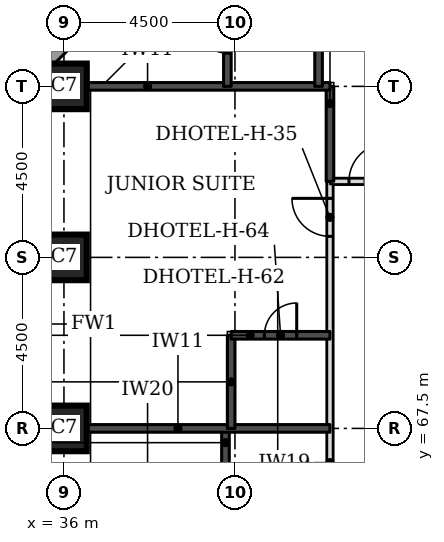
"""IFC4 building model, lengths in metres.
Left out: names, types, materials, properties, quantities, classifications, styles, units other than length and angle.
Written with IfcOpenShell. Run it as: python <this file> out.ifc"""

import sys

from ifc_helpers import new_model, si_unit, direction, frame, frame_2d, origin, origin_2d, place, context, subcontext, project, spatial, rectangle, extrude, element, fill, save


model = new_model("IFC4")
c1 = context("Model", 3, precision=1e-05, world=origin(), true_north=direction((0.0, 1.0)))
c2 = subcontext(c1, "Body", "Model", "MODEL_VIEW")
j1 = project(units=[si_unit("LENGTHUNIT", "METRE"), si_unit("PLANEANGLEUNIT", "RADIAN")], contexts=[c1])
p1 = place(None, origin())
s1 = spatial("IfcSite", under=j1, at=p1, CompositionType="ELEMENT")
p2 = place(p1, origin())
s2 = spatial("IfcBuilding", under=s1, at=p2, CompositionType="ELEMENT")
p3 = place(p2, frame((0.0, 0.0, 46.2)))
s3 = spatial("IfcBuildingStorey", under=s2, at=p3, CompositionType="ELEMENT", Elevation=46.2)
for number, where, z_axis, x_axis in (
    (1, (36.0, 67.5, 0.0), (0.0, 0.0, 1.0), (1.0, 0.0, 0.0)),
    (2, (36.0, 72.0, 0.0), (0.0, 0.0, 1.0), (1.0, 0.0, 0.0)),
    (3, (36.0, 76.5, 0.0), (0.0, 0.0, 1.0), (1.0, 0.0, 0.0)),
):
    element("IfcColumn", number, at=place(p3, frame(where, z_axis=z_axis, x_axis=x_axis)), inside=s3, PredefinedType="COLUMN", context=c2, shape_type="SweptSolid", body=[
        extrude(rectangle(XDim=1.2, YDim=1.2, at=origin_2d()), origin(), (0.0, 0.0, 1.0), 3.3),
    ])
p4 = place(p3, frame((40.23, 81.826, 0.0), z_axis=(0.0, 0.0, 1.0), x_axis=(-0.707106781187, -0.707106781187, 0.0)))
e4 = element("IfcWall", 4, at=p4, inside=s3, PredefinedType="STANDARD", context=c2, shape_type="SweptSolid", body=[
    extrude(rectangle(XDim=7.151, YDim=0.35, at=frame_2d((3.576, 0.0))), origin(), (0.0, 0.0, 1.0), 3.055),
])
p5 = place(p4, frame((1.926, 0.0, 0.8)))
e5 = element("IfcOpeningElement", 5, at=p5, cuts=e4, PredefinedType="OPENING", context=c2, shape_type="SweptSolid", body=[
    extrude(rectangle(XDim=3.3, YDim=1.5, at=frame_2d((1.65, 0.75))), frame((0.0, 0.185, 0.0), z_axis=(0.0, -1.0, 0.0), x_axis=(1.0, 0.0, 0.0)), (0.0, 0.0, 1.0), 0.37),
])
p6 = place(p3, frame((43.0, 56.0, 0.0), z_axis=(0.0, 0.0, 1.0), x_axis=(0.0, 1.0, 0.0)))
e6 = element("IfcWall", 6, at=p6, inside=s3, PredefinedType="PARTITIONING", context=c2, shape_type="SweptSolid", body=[
    extrude(rectangle(XDim=18.0, YDim=0.15, at=frame_2d((9.0, 0.0))), origin(), (0.0, 0.0, 1.0), 3.08),
])
p7 = place(p6, frame((7.575, 0.0, 0.0)))
e7 = element("IfcOpeningElement", 7, at=p7, cuts=e6, PredefinedType="OPENING", context=c2, shape_type="SweptSolid", body=[
    extrude(rectangle(XDim=1.0, YDim=2.1, at=frame_2d((0.5, 1.05))), frame((0.0, 0.085, 0.0), z_axis=(0.0, -1.0, 0.0), x_axis=(1.0, 0.0, 0.0)), (0.0, 0.0, 1.0), 0.17),
])
p8 = place(p6, frame((16.553, 0.0, 0.0)))
e8 = element("IfcOpeningElement", 8, at=p8, cuts=e6, PredefinedType="OPENING", context=c2, shape_type="SweptSolid", body=[
    extrude(rectangle(XDim=1.0, YDim=2.1, at=frame_2d((0.5, 1.05))), frame((0.0, 0.085, 0.0), z_axis=(0.0, -1.0, 0.0), x_axis=(1.0, 0.0, 0.0)), (0.0, 0.0, 1.0), 0.17),
])
p9 = place(p6, frame((3.05, 0.0, 0.0)))
e9 = element("IfcOpeningElement", 9, at=p9, cuts=e6, PredefinedType="OPENING", context=c2, shape_type="SweptSolid", body=[
    extrude(rectangle(XDim=0.9, YDim=2.1, at=frame_2d((0.45, 1.05))), frame((0.0, 0.085, 0.0), z_axis=(0.0, -1.0, 0.0), x_axis=(1.0, 0.0, 0.0)), (0.0, 0.0, 1.0), 0.17),
])
p10 = place(p3, frame((43.0, 74.0, 0.0), z_axis=(0.0, 0.0, 1.0), x_axis=(1.0, 0.0, 0.0)))
e10 = element("IfcWall", 10, at=p10, inside=s3, PredefinedType="PARTITIONING", context=c2, shape_type="SweptSolid", body=[
    extrude(rectangle(XDim=26.5, YDim=0.15, at=frame_2d((13.25, 0.0))), origin(), (0.0, 0.0, 1.0), 3.08),
])
p11 = place(p10, frame((2.575, 0.0, 0.0)))
e11 = element("IfcOpeningElement", 11, at=p11, cuts=e10, PredefinedType="OPENING", context=c2, shape_type="SweptSolid", body=[
    extrude(rectangle(XDim=1.0, YDim=2.1, at=frame_2d((0.5, 1.05))), frame((0.0, 0.085, 0.0), z_axis=(0.0, -1.0, 0.0), x_axis=(1.0, 0.0, 0.0)), (0.0, 0.0, 1.0), 0.17),
])
p12 = place(p10, frame((9.175, 0.0, 0.0)))
e12 = element("IfcOpeningElement", 12, at=p12, cuts=e10, PredefinedType="OPENING", context=c2, shape_type="SweptSolid", body=[
    extrude(rectangle(XDim=1.0, YDim=2.1, at=frame_2d((0.5, 1.05))), frame((0.0, 0.085, 0.0), z_axis=(0.0, -1.0, 0.0), x_axis=(1.0, 0.0, 0.0)), (0.0, 0.0, 1.0), 0.17),
])
p13 = place(p10, frame((11.575, 0.0, 0.0)))
e13 = element("IfcOpeningElement", 13, at=p13, cuts=e10, PredefinedType="OPENING", context=c2, shape_type="SweptSolid", body=[
    extrude(rectangle(XDim=1.0, YDim=2.1, at=frame_2d((0.5, 1.05))), frame((0.0, 0.085, 0.0), z_axis=(0.0, -1.0, 0.0), x_axis=(1.0, 0.0, 0.0)), (0.0, 0.0, 1.0), 0.17),
])
p14 = place(p10, frame((18.175, 0.0, 0.0)))
e14 = element("IfcOpeningElement", 14, at=p14, cuts=e10, PredefinedType="OPENING", context=c2, shape_type="SweptSolid", body=[
    extrude(rectangle(XDim=1.0, YDim=2.1, at=frame_2d((0.5, 1.05))), frame((0.0, 0.085, 0.0), z_axis=(0.0, -1.0, 0.0), x_axis=(1.0, 0.0, 0.0)), (0.0, 0.0, 1.0), 0.17),
])
p15 = place(p10, frame((20.575, 0.0, 0.0)))
e15 = element("IfcOpeningElement", 15, at=p15, cuts=e10, PredefinedType="OPENING", context=c2, shape_type="SweptSolid", body=[
    extrude(rectangle(XDim=1.0, YDim=2.1, at=frame_2d((0.5, 1.05))), frame((0.0, 0.085, 0.0), z_axis=(0.0, -1.0, 0.0), x_axis=(1.0, 0.0, 0.0)), (0.0, 0.0, 1.0), 0.17),
])
p16 = place(p10, frame((0.5, 0.0, 0.0)))
e16 = element("IfcOpeningElement", 16, at=p16, cuts=e10, PredefinedType="OPENING", context=c2, shape_type="SweptSolid", body=[
    extrude(rectangle(XDim=1.0, YDim=2.1, at=frame_2d((0.5, 1.05))), frame((0.0, 0.085, 0.0), z_axis=(0.0, -1.0, 0.0), x_axis=(1.0, 0.0, 0.0)), (0.0, 0.0, 1.0), 0.17),
])
p17 = place(p10, frame((25.0, 0.0, 0.0)))
e17 = element("IfcOpeningElement", 17, at=p17, cuts=e10, PredefinedType="OPENING", context=c2, shape_type="SweptSolid", body=[
    extrude(rectangle(XDim=1.0, YDim=2.1, at=frame_2d((0.5, 1.05))), frame((0.0, 0.085, 0.0), z_axis=(0.0, -1.0, 0.0), x_axis=(1.0, 0.0, 0.0)), (0.0, 0.0, 1.0), 0.17),
])
p18 = place(p3, frame((40.25, 65.15, 0.0), z_axis=(0.0, 0.0, 1.0), x_axis=(0.0, 1.0, 0.0)))
e18 = element("IfcWall", 18, at=p18, inside=s3, PredefinedType="SOLIDWALL", context=c2, shape_type="SweptSolid", body=[
    extrude(rectangle(XDim=2.35, YDim=0.2, at=frame_2d((1.175, 0.0))), origin(), (0.0, 0.0, 1.0), 3.08),
])
p19 = place(p3, frame((36.6, 67.5, 0.0), z_axis=(0.0, 0.0, 1.0), x_axis=(1.0, 0.0, 0.0)))
e19 = element("IfcWall", 19, at=p19, inside=s3, PredefinedType="SOLIDWALL", context=c2, shape_type="SweptSolid", body=[
    extrude(rectangle(XDim=6.4, YDim=0.2, at=frame_2d((3.2, 0.0))), origin(), (0.0, 0.0, 1.0), 3.08),
])
p20 = place(p3, frame((40.4, 67.5, 0.0), z_axis=(0.0, 0.0, 1.0), x_axis=(0.0, 1.0, 0.0)))
e20 = element("IfcWall", 20, at=p20, inside=s3, PredefinedType="SOLIDWALL", context=c2, shape_type="SweptSolid", body=[
    extrude(rectangle(XDim=2.45, YDim=0.2, at=frame_2d((1.225, 0.0))), origin(), (0.0, 0.0, 1.0), 3.08),
])
p21 = place(p3, frame((40.4, 69.95, 0.0), z_axis=(0.0, 0.0, 1.0), x_axis=(1.0, 0.0, 0.0)))
e21 = element("IfcWall", 21, at=p21, inside=s3, PredefinedType="SOLIDWALL", context=c2, shape_type="SweptSolid", body=[
    extrude(rectangle(XDim=2.6, YDim=0.2, at=frame_2d((1.3, 0.0))), origin(), (0.0, 0.0, 1.0), 3.08),
])
p22 = place(p21, frame((0.875, 0.0, 0.0)))
e22 = element("IfcOpeningElement", 22, at=p22, cuts=e21, PredefinedType="OPENING", context=c2, shape_type="SweptSolid", body=[
    extrude(rectangle(XDim=0.85, YDim=2.1, at=frame_2d((0.425, 1.05))), frame((0.0, 0.11, 0.0), z_axis=(0.0, -1.0, 0.0), x_axis=(1.0, 0.0, 0.0)), (0.0, 0.0, 1.0), 0.22),
])
p23 = place(p3, frame((43.0, 74.0, 0.0), z_axis=(0.0, 0.0, 1.0), x_axis=(0.0, 1.0, 0.0)))
e23 = element("IfcWall", 23, at=p23, inside=s3, PredefinedType="SOLIDWALL", context=c2, shape_type="SweptSolid", body=[
    extrude(rectangle(XDim=2.5, YDim=0.2, at=frame_2d((1.25, 0.0))), origin(), (0.0, 0.0, 1.0), 3.08),
])
p24 = place(p3, frame((36.6, 76.5, 0.0), z_axis=(0.0, 0.0, 1.0), x_axis=(1.0, 0.0, 0.0)))
e24 = element("IfcWall", 24, at=p24, inside=s3, PredefinedType="SOLIDWALL", context=c2, shape_type="SweptSolid", body=[
    extrude(rectangle(XDim=6.4, YDim=0.2, at=frame_2d((3.2, 0.0))), origin(), (0.0, 0.0, 1.0), 3.08),
])
p25 = place(p3, frame((40.3, 76.5, 0.0), z_axis=(0.0, 0.0, 1.0), x_axis=(0.0, 1.0, 0.0)))
e25 = element("IfcWall", 25, at=p25, inside=s3, PredefinedType="SOLIDWALL", context=c2, shape_type="SweptSolid", body=[
    extrude(rectangle(XDim=2.5, YDim=0.2, at=frame_2d((1.25, 0.0))), origin(), (0.0, 0.0, 1.0), 3.08),
])
p26 = place(p25, frame((0.875, 0.0, 0.0)))
e26 = element("IfcOpeningElement", 26, at=p26, cuts=e25, PredefinedType="OPENING", context=c2, shape_type="SweptSolid", body=[
    extrude(rectangle(XDim=0.85, YDim=2.1, at=frame_2d((0.425, 1.05))), frame((0.0, 0.11, 0.0), z_axis=(0.0, -1.0, 0.0), x_axis=(1.0, 0.0, 0.0)), (0.0, 0.0, 1.0), 0.22),
])
p27 = place(p3, frame((42.7, 76.5, 0.0), z_axis=(0.0, 0.0, 1.0), x_axis=(0.0, 1.0, 0.0)))
e27 = element("IfcWall", 27, at=p27, inside=s3, PredefinedType="SOLIDWALL", context=c2, shape_type="SweptSolid", body=[
    extrude(rectangle(XDim=2.5, YDim=0.2, at=frame_2d((1.25, 0.0))), origin(), (0.0, 0.0, 1.0), 3.08),
])
p28 = place(p8, origin())
e28 = element("IfcDoor", 28, at=p28, inside=s3, OperationType="SINGLE_SWING_RIGHT", PredefinedType="DOOR", context=c2, shape_type="SweptSolid", body=[
    extrude(rectangle(XDim=1.0, YDim=2.1, at=frame_2d((0.5, 1.05))), frame((0.0, 0.025, 0.0), z_axis=(0.0, -1.0, 0.0), x_axis=(1.0, 0.0, 0.0)), (0.0, 0.0, 1.0), 0.05),
])
fill(e8, e28)
p29 = place(p22, origin())
e29 = element("IfcDoor", 29, at=p29, inside=s3, OperationType="SINGLE_SWING_RIGHT", PredefinedType="DOOR", context=c2, shape_type="SweptSolid", body=[
    extrude(rectangle(XDim=0.85, YDim=2.1, at=frame_2d((0.425, 1.05))), frame((0.0, 0.025, 0.0), z_axis=(0.0, -1.0, 0.0), x_axis=(1.0, 0.0, 0.0)), (0.0, 0.0, 1.0), 0.05),
])
fill(e22, e29)
p30 = place(p16, origin())
e30 = element("IfcDoor", 30, at=p30, inside=s3, OperationType="SINGLE_SWING_RIGHT", PredefinedType="DOOR", context=c2, shape_type="SweptSolid", body=[
    extrude(rectangle(XDim=1.0, YDim=2.1, at=frame_2d((0.5, 1.05))), frame((0.0, 0.025, 0.0), z_axis=(0.0, -1.0, 0.0), x_axis=(1.0, 0.0, 0.0)), (0.0, 0.0, 1.0), 0.05),
])
fill(e16, e30)
p31 = place(p26, origin())
e31 = element("IfcDoor", 31, at=p31, inside=s3, OperationType="SINGLE_SWING_RIGHT", PredefinedType="DOOR", context=c2, shape_type="SweptSolid", body=[
    extrude(rectangle(XDim=0.85, YDim=2.1, at=frame_2d((0.425, 1.05))), frame((0.0, 0.025, 0.0), z_axis=(0.0, -1.0, 0.0), x_axis=(1.0, 0.0, 0.0)), (0.0, 0.0, 1.0), 0.05),
])
fill(e26, e31)
save(model, sys.argv[1])
